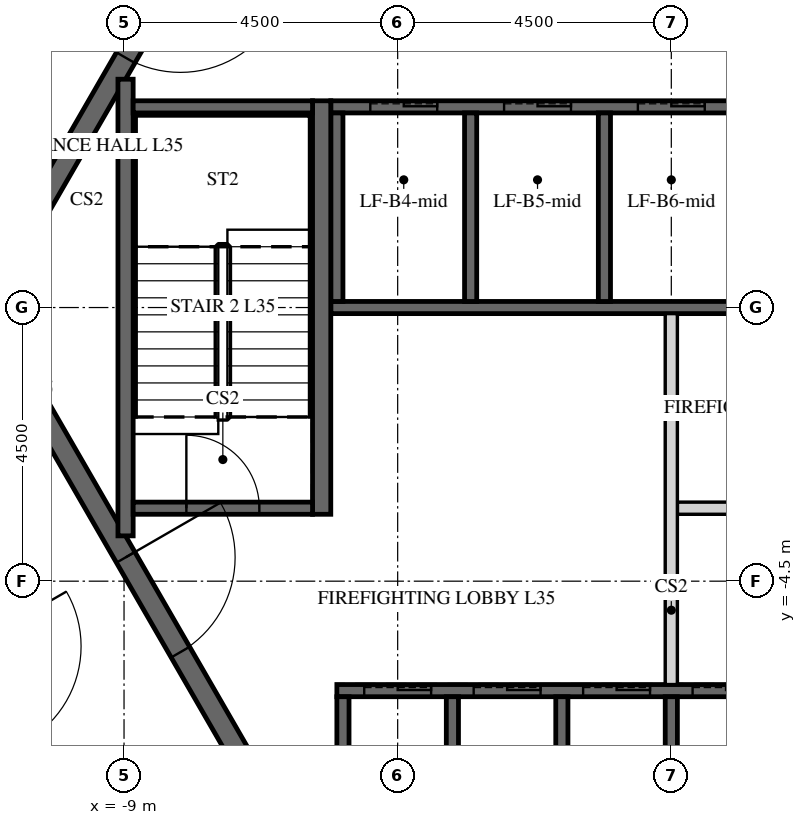
"""IFC4 building model, lengths in metres.
Left out: names, types, materials, properties, quantities, classifications, styles, units other than length and angle.
Written with IfcOpenShell. Run it as: python <this file> out.ifc"""

import sys

from ifc_helpers import new_model, si_unit, direction, frame, frame_2d, origin, place, context, subcontext, project, spatial, polyline, rectangle, outline, extrude, element, fill, save


model = new_model("IFC4")
c1 = context("Model", 3, precision=1e-05, world=origin(), true_north=direction((0.0, 1.0)))
c2 = subcontext(c1, "Body", "Model", "MODEL_VIEW")
j1 = project(units=[si_unit("LENGTHUNIT", "METRE"), si_unit("PLANEANGLEUNIT", "RADIAN")], contexts=[c1])
p1 = place(None, origin())
s1 = spatial("IfcSite", under=j1, at=p1, CompositionType="ELEMENT")
p2 = place(p1, origin())
s2 = spatial("IfcBuilding", under=s1, at=p2, CompositionType="ELEMENT")
p3 = place(p2, frame((0.0, 0.0, 152.7)))
s3 = spatial("IfcBuildingStorey", under=s2, at=p3, CompositionType="ELEMENT", Elevation=152.7)
p4 = place(p3, frame((-7.361, 12.75, 0.0), z_axis=(0.0, 0.0, 1.0), x_axis=(-0.50000571537, -0.866022103989, 0.0)))
e1 = element("IfcWall", 1, at=p4, inside=s3, PredefinedType="SHEAR", context=c2, shape_type="SweptSolid", body=[
    extrude(outline(polyline([(-0.144, -0.25), (14.867, -0.25), (14.578, 0.25), (0.144, 0.25), (-0.144, -0.25)])), origin(), (0.0, 0.0, 1.0), 3.75),
])
p5 = place(p4, frame((6.49, 0.0, 0.0)))
e2 = element("IfcOpeningElement", 2, at=p5, cuts=e1, PredefinedType="OPENING", context=c2, shape_type="SweptSolid", body=[
    extrude(rectangle(XDim=1.8, YDim=2.4, at=frame_2d((0.9, 1.2))), frame((0.0, 0.26, 0.0), z_axis=(0.0, -1.0, 0.0), x_axis=(1.0, 0.0, 0.0)), (0.0, 0.0, 1.0), 0.52),
])
p6 = place(p3, frame((-14.722, 0.0, 0.0), z_axis=(0.0, 0.0, 1.0), x_axis=(0.50000571537, -0.866022103989, 0.0)))
e3 = element("IfcWall", 3, at=p6, inside=s3, PredefinedType="SHEAR", context=c2, shape_type="SweptSolid", body=[
    extrude(outline(polyline([(-0.144, -0.25), (14.867, -0.25), (14.578, 0.25), (0.144, 0.25), (-0.144, -0.25)])), origin(), (0.0, 0.0, 1.0), 3.75),
])
p7 = place(p6, frame((6.432, 0.0, 0.0)))
e4 = element("IfcOpeningElement", 4, at=p7, cuts=e3, PredefinedType="OPENING", context=c2, shape_type="SweptSolid", body=[
    extrude(rectangle(XDim=1.8, YDim=2.4, at=frame_2d((0.9, 1.2))), frame((0.0, 0.26, 0.0), z_axis=(0.0, -1.0, 0.0), x_axis=(1.0, 0.0, 0.0)), (0.0, 0.0, 1.0), 0.52),
])
p8 = place(p3, frame((-5.673, 9.825, 0.0), z_axis=(0.0, 0.0, 1.0), x_axis=(-0.499995046907, -0.866028263435, 0.0)))
e5 = element("IfcWall", 5, at=p8, inside=s3, PredefinedType="SHEAR", context=c2, shape_type="SweptSolid", body=[
    extrude(outline(polyline([(-0.101, -0.175), (11.446, -0.175), (11.244, 0.175), (0.101, 0.175), (-0.101, -0.175)])), origin(), (0.0, 0.0, 1.0), 3.75),
])
p9 = place(p8, frame((4.801, 0.0, 0.0)))
e6 = element("IfcOpeningElement", 6, at=p9, cuts=e5, PredefinedType="OPENING", context=c2, shape_type="SweptSolid", body=[
    extrude(rectangle(XDim=1.8, YDim=2.4, at=frame_2d((0.9, 1.2))), frame((0.0, 0.185, 0.0), z_axis=(0.0, -1.0, 0.0), x_axis=(1.0, 0.0, 0.0)), (0.0, 0.0, 1.0), 0.37),
])
p10 = place(p3, frame((-11.345, 0.0, 0.0), z_axis=(0.0, 0.0, 1.0), x_axis=(0.499995046907, -0.866028263435, 0.0)))
e7 = element("IfcWall", 7, at=p10, inside=s3, PredefinedType="SHEAR", context=c2, shape_type="SweptSolid", body=[
    extrude(outline(polyline([(-0.101, -0.175), (11.446, -0.175), (11.244, 0.175), (0.101, 0.175), (-0.101, -0.175)])), origin(), (0.0, 0.0, 1.0), 3.75),
])
p11 = place(p10, frame((4.744, 0.0, 0.0)))
e8 = element("IfcOpeningElement", 8, at=p11, cuts=e7, PredefinedType="OPENING", context=c2, shape_type="SweptSolid", body=[
    extrude(rectangle(XDim=1.8, YDim=2.4, at=frame_2d((0.9, 1.2))), frame((0.0, 0.185, 0.0), z_axis=(0.0, -1.0, 0.0), x_axis=(1.0, 0.0, 0.0)), (0.0, 0.0, 1.0), 0.37),
])
p12 = place(p3, frame((-5.6, 3.3, -0.5), z_axis=(0.0, 0.0, 1.0), x_axis=(1.0, 0.0, 0.0)))
e9 = element("IfcWall", 9, at=p12, inside=s3, PredefinedType="SHEAR", context=c2, shape_type="SweptSolid", body=[
    extrude(rectangle(XDim=11.2, YDim=0.2, at=frame_2d((5.6, 0.0))), origin(), (0.0, 0.0, 1.0), 4.15),
])
p13 = place(p12, frame((0.65, 0.0, 0.5)))
e10 = element("IfcOpeningElement", 10, at=p13, cuts=e9, PredefinedType="OPENING", context=c2, shape_type="SweptSolid", body=[
    extrude(rectangle(XDim=1.1, YDim=2.1, at=frame_2d((0.55, 1.05))), frame((0.0, 0.11, 0.0), z_axis=(0.0, -1.0, 0.0), x_axis=(1.0, 0.0, 0.0)), (0.0, 0.0, 1.0), 0.22),
])
p14 = place(p12, frame((2.85, 0.0, 0.5)))
e11 = element("IfcOpeningElement", 11, at=p14, cuts=e9, PredefinedType="OPENING", context=c2, shape_type="SweptSolid", body=[
    extrude(rectangle(XDim=1.1, YDim=2.1, at=frame_2d((0.55, 1.05))), frame((0.0, 0.11, 0.0), z_axis=(0.0, -1.0, 0.0), x_axis=(1.0, 0.0, 0.0)), (0.0, 0.0, 1.0), 0.22),
])
p15 = place(p12, frame((5.05, 0.0, 0.5)))
e12 = element("IfcOpeningElement", 12, at=p15, cuts=e9, PredefinedType="OPENING", context=c2, shape_type="SweptSolid", body=[
    extrude(rectangle(XDim=1.1, YDim=2.1, at=frame_2d((0.55, 1.05))), frame((0.0, 0.11, 0.0), z_axis=(0.0, -1.0, 0.0), x_axis=(1.0, 0.0, 0.0)), (0.0, 0.0, 1.0), 0.22),
])
p16 = place(p12, frame((7.25, 0.0, 0.5)))
e13 = element("IfcOpeningElement", 13, at=p16, cuts=e9, PredefinedType="OPENING", context=c2, shape_type="SweptSolid", body=[
    extrude(rectangle(XDim=1.1, YDim=2.1, at=frame_2d((0.55, 1.05))), frame((0.0, 0.11, 0.0), z_axis=(0.0, -1.0, 0.0), x_axis=(1.0, 0.0, 0.0)), (0.0, 0.0, 1.0), 0.22),
])
p17 = place(p12, frame((9.45, 0.0, 0.5)))
e14 = element("IfcOpeningElement", 14, at=p17, cuts=e9, PredefinedType="OPENING", context=c2, shape_type="SweptSolid", body=[
    extrude(rectangle(XDim=1.1, YDim=2.1, at=frame_2d((0.55, 1.05))), frame((0.0, 0.11, 0.0), z_axis=(0.0, -1.0, 0.0), x_axis=(1.0, 0.0, 0.0)), (0.0, 0.0, 1.0), 0.22),
])
p18 = place(p3, frame((-5.6, 0.0, -0.5), z_axis=(0.0, 0.0, 1.0), x_axis=(1.0, 0.0, 0.0)))
e15 = element("IfcWall", 15, at=p18, inside=s3, PredefinedType="SHEAR", context=c2, shape_type="SweptSolid", body=[
    extrude(rectangle(XDim=11.2, YDim=0.2, at=frame_2d((5.6, 0.0))), origin(), (0.0, 0.0, 1.0), 4.15),
])
for number, where, z_axis, x_axis in (
    (16, (-5.5, 0.1, -0.5), (0.0, 0.0, 1.0), (0.0, 1.0, 0.0)),
    (17, (-3.3, 0.1, -0.5), (0.0, 0.0, 1.0), (0.0, 1.0, 0.0)),
    (18, (-1.1, 0.1, -0.5), (0.0, 0.0, 1.0), (0.0, 1.0, 0.0)),
):
    element("IfcWall", number, at=place(p3, frame(where, z_axis=z_axis, x_axis=x_axis)), inside=s3, PredefinedType="SHEAR", context=c2, shape_type="SweptSolid", body=[
        extrude(rectangle(XDim=3.1, YDim=0.2, at=frame_2d((1.55, 0.0))), origin(), (0.0, 0.0, 1.0), 4.15),
    ])
p19 = place(p3, frame((-5.5, -6.3, -0.5), z_axis=(0.0, 0.0, 1.0), x_axis=(1.0, 0.0, 0.0)))
e19 = element("IfcWall", 19, at=p19, inside=s3, PredefinedType="SHEAR", context=c2, shape_type="SweptSolid", body=[
    extrude(rectangle(XDim=9.2, YDim=0.2, at=frame_2d((4.6, 0.0))), origin(), (0.0, 0.0, 1.0), 4.15),
])
p20 = place(p19, frame((0.45, 0.0, 0.5)))
e20 = element("IfcOpeningElement", 20, at=p20, cuts=e19, PredefinedType="OPENING", context=c2, shape_type="SweptSolid", body=[
    extrude(rectangle(XDim=1.1, YDim=2.1, at=frame_2d((0.55, 1.05))), frame((0.0, 0.11, 0.0), z_axis=(0.0, -1.0, 0.0), x_axis=(1.0, 0.0, 0.0)), (0.0, 0.0, 1.0), 0.22),
])
p21 = place(p19, frame((2.25, 0.0, 0.5)))
e21 = element("IfcOpeningElement", 21, at=p21, cuts=e19, PredefinedType="OPENING", context=c2, shape_type="SweptSolid", body=[
    extrude(rectangle(XDim=1.1, YDim=2.1, at=frame_2d((0.55, 1.05))), frame((0.0, 0.11, 0.0), z_axis=(0.0, -1.0, 0.0), x_axis=(1.0, 0.0, 0.0)), (0.0, 0.0, 1.0), 0.22),
])
p22 = place(p19, frame((4.05, 0.0, 0.5)))
e22 = element("IfcOpeningElement", 22, at=p22, cuts=e19, PredefinedType="OPENING", context=c2, shape_type="SweptSolid", body=[
    extrude(rectangle(XDim=1.1, YDim=2.1, at=frame_2d((0.55, 1.05))), frame((0.0, 0.11, 0.0), z_axis=(0.0, -1.0, 0.0), x_axis=(1.0, 0.0, 0.0)), (0.0, 0.0, 1.0), 0.22),
])
p23 = place(p19, frame((5.85, 0.0, 0.5)))
e23 = element("IfcOpeningElement", 23, at=p23, cuts=e19, PredefinedType="OPENING", context=c2, shape_type="SweptSolid", body=[
    extrude(rectangle(XDim=1.1, YDim=2.1, at=frame_2d((0.55, 1.05))), frame((0.0, 0.11, 0.0), z_axis=(0.0, -1.0, 0.0), x_axis=(1.0, 0.0, 0.0)), (0.0, 0.0, 1.0), 0.22),
])
p24 = place(p19, frame((7.65, 0.0, 0.5)))
e24 = element("IfcOpeningElement", 24, at=p24, cuts=e19, PredefinedType="OPENING", context=c2, shape_type="SweptSolid", body=[
    extrude(rectangle(XDim=1.1, YDim=2.1, at=frame_2d((0.55, 1.05))), frame((0.0, 0.11, 0.0), z_axis=(0.0, -1.0, 0.0), x_axis=(1.0, 0.0, 0.0)), (0.0, 0.0, 1.0), 0.22),
])
for number, where, z_axis, x_axis in (
    (25, (-5.4, -9.3, -0.5), (0.0, 0.0, 1.0), (0.0, 1.0, 0.0)),
    (26, (-3.6, -9.3, -0.5), (0.0, 0.0, 1.0), (0.0, 1.0, 0.0)),
    (27, (-1.8, -9.3, -0.5), (0.0, 0.0, 1.0), (0.0, 1.0, 0.0)),
    (28, (0.0, -9.3, -0.5), (0.0, 0.0, 1.0), (0.0, 1.0, 0.0)),
):
    element("IfcWall", number, at=place(p3, frame(where, z_axis=z_axis, x_axis=x_axis)), inside=s3, PredefinedType="SHEAR", context=c2, shape_type="SweptSolid", body=[
        extrude(rectangle(XDim=2.9, YDim=0.2, at=frame_2d((1.45, 0.0))), origin(), (0.0, 0.0, 1.0), 4.15),
    ])
p25 = place(p3, frame((0.1, -3.3, 0.0), z_axis=(0.0, 0.0, 1.0), x_axis=(1.0, 0.0, 0.0)))
e29 = element("IfcWall", 29, at=p25, inside=s3, PredefinedType="PARTITIONING", context=c2, shape_type="SweptSolid", body=[
    extrude(rectangle(XDim=5.5, YDim=0.2, at=frame_2d((2.75, 0.0))), origin(), (0.0, 0.0, 1.0), 3.65),
])
p26 = place(p25, frame((2.3, 0.0, 0.0)))
e30 = element("IfcOpeningElement", 30, at=p26, cuts=e29, PredefinedType="OPENING", context=c2, shape_type="SweptSolid", body=[
    extrude(rectangle(XDim=0.9, YDim=2.1, at=frame_2d((0.45, 1.05))), frame((0.0, 0.11, 0.0), z_axis=(0.0, -1.0, 0.0), x_axis=(1.0, 0.0, 0.0)), (0.0, 0.0, 1.0), 0.22),
])
p27 = place(p3, frame((0.0, -6.2, 0.0), z_axis=(0.0, 0.0, 1.0), x_axis=(0.0, 1.0, 0.0)))
e31 = element("IfcWall", 31, at=p27, inside=s3, PredefinedType="PARTITIONING", context=c2, shape_type="SweptSolid", body=[
    extrude(rectangle(XDim=6.1, YDim=0.2, at=frame_2d((3.05, 0.0))), origin(), (0.0, 0.0, 1.0), 3.65),
])
p28 = place(p3, frame((-5.75, -3.4, -0.5), z_axis=(0.0, 0.0, 1.0), x_axis=(0.0, 1.0, 0.0)))
e32 = element("IfcWall", 32, at=p28, inside=s3, PredefinedType="SHEAR", context=c2, shape_type="SweptSolid", body=[
    extrude(rectangle(XDim=6.8, YDim=0.3, at=frame_2d((3.4, 0.0))), origin(), (0.0, 0.0, 1.0), 4.15),
])
p29 = place(p3, frame((-8.975, -3.755, -0.5), z_axis=(0.0, 0.0, 1.0), x_axis=(0.0, 1.0, 0.0)))
e33 = element("IfcWall", 33, at=p29, inside=s3, PredefinedType="SHEAR", context=c2, shape_type="SweptSolid", body=[
    extrude(rectangle(XDim=7.51, YDim=0.25, at=frame_2d((3.755, 0.0))), origin(), (0.0, 0.0, 1.0), 4.15),
])
p30 = place(p3, frame((-8.85, 3.3, -0.5), z_axis=(0.0, 0.0, 1.0), x_axis=(1.0, 0.0, 0.0)))
e34 = element("IfcWall", 34, at=p30, inside=s3, PredefinedType="SHEAR", context=c2, shape_type="SweptSolid", body=[
    extrude(rectangle(XDim=2.95, YDim=0.2, at=frame_2d((1.475, 0.0))), origin(), (0.0, 0.0, 1.0), 4.15),
])
p31 = place(p3, frame((-8.85, -3.3, -0.5), z_axis=(0.0, 0.0, 1.0), x_axis=(1.0, 0.0, 0.0)))
e35 = element("IfcWall", 35, at=p31, inside=s3, PredefinedType="SHEAR", context=c2, shape_type="SweptSolid", body=[
    extrude(rectangle(XDim=2.95, YDim=0.2, at=frame_2d((1.475, 0.0))), origin(), (0.0, 0.0, 1.0), 4.15),
])
p32 = place(p31, frame((0.875, 0.0, 0.5)))
e36 = element("IfcOpeningElement", 36, at=p32, cuts=e35, PredefinedType="OPENING", context=c2, shape_type="SweptSolid", body=[
    extrude(rectangle(XDim=1.2, YDim=2.4, at=frame_2d((0.6, 1.2))), frame((0.0, 0.11, 0.0), z_axis=(0.0, -1.0, 0.0), x_axis=(1.0, 0.0, 0.0)), (0.0, 0.0, 1.0), 0.22),
])
p33 = place(p3, frame((-8.588, 14.725, 0.0), z_axis=(0.0, 0.0, 1.0), x_axis=(-0.499996322767, -0.866027526826, 0.0)))
e37 = element("IfcWall", 37, at=p33, inside=s3, PredefinedType="PARTITIONING", context=c2, shape_type="SweptSolid", body=[
    extrude(rectangle(XDim=14.636, YDim=0.15, at=frame_2d((7.318, 0.0))), origin(), (0.0, 0.0, 1.0), 2.823),
])
p34 = place(p33, frame((0.936, 0.0, 0.0)))
e38 = element("IfcOpeningElement", 38, at=p34, cuts=e37, PredefinedType="OPENING", context=c2, shape_type="SweptSolid", body=[
    extrude(rectangle(XDim=1.0, YDim=2.1, at=frame_2d((0.5, 1.05))), frame((0.0, 0.085, 0.0), z_axis=(0.0, -1.0, 0.0), x_axis=(1.0, 0.0, 0.0)), (0.0, 0.0, 1.0), 0.17),
])
p35 = place(p33, frame((9.495, 0.0, 0.0)))
e39 = element("IfcOpeningElement", 39, at=p35, cuts=e37, PredefinedType="OPENING", context=c2, shape_type="SweptSolid", body=[
    extrude(rectangle(XDim=1.0, YDim=2.1, at=frame_2d((0.5, 1.05))), frame((0.0, 0.085, 0.0), z_axis=(0.0, -1.0, 0.0), x_axis=(1.0, 0.0, 0.0)), (0.0, 0.0, 1.0), 0.17),
])
p36 = place(p3, frame((-15.863, -2.125, 0.0), z_axis=(0.0, 0.0, 1.0), x_axis=(0.500008833422, -0.866020303746, 0.0)))
e40 = element("IfcWall", 40, at=p36, inside=s3, PredefinedType="PARTITIONING", context=c2, shape_type="SweptSolid", body=[
    extrude(rectangle(XDim=14.636, YDim=0.15, at=frame_2d((7.318, 0.0))), origin(), (0.0, 0.0, 1.0), 2.823),
])
p37 = place(p36, frame((0.961, 0.0, 0.0)))
e41 = element("IfcOpeningElement", 41, at=p37, cuts=e40, PredefinedType="OPENING", context=c2, shape_type="SweptSolid", body=[
    extrude(rectangle(XDim=1.0, YDim=2.1, at=frame_2d((0.5, 1.05))), frame((0.0, 0.085, 0.0), z_axis=(0.0, -1.0, 0.0), x_axis=(1.0, 0.0, 0.0)), (0.0, 0.0, 1.0), 0.17),
])
p38 = place(p36, frame((7.309, 0.0, 0.0)))
e42 = element("IfcOpeningElement", 42, at=p38, cuts=e40, PredefinedType="OPENING", context=c2, shape_type="SweptSolid", body=[
    extrude(rectangle(XDim=1.0, YDim=2.1, at=frame_2d((0.5, 1.05))), frame((0.0, 0.085, 0.0), z_axis=(0.0, -1.0, 0.0), x_axis=(1.0, 0.0, 0.0)), (0.0, 0.0, 1.0), 0.17),
])
p39 = place(p36, frame((13.486, 0.0, 0.0)))
e43 = element("IfcOpeningElement", 43, at=p39, cuts=e40, PredefinedType="OPENING", context=c2, shape_type="SweptSolid", body=[
    extrude(rectangle(XDim=1.0, YDim=2.1, at=frame_2d((0.5, 1.05))), frame((0.0, 0.085, 0.0), z_axis=(0.0, -1.0, 0.0), x_axis=(1.0, 0.0, 0.0)), (0.0, 0.0, 1.0), 0.17),
])
p40 = place(p9, origin())
e44 = element("IfcDoor", 44, at=p40, inside=s3, OperationType="DOUBLE_DOOR_SINGLE_SWING", PredefinedType="DOOR", context=c2, shape_type="SweptSolid", body=[
    extrude(rectangle(XDim=1.8, YDim=2.4, at=frame_2d((0.9, 1.2))), frame((0.0, 0.025, 0.0), z_axis=(0.0, -1.0, 0.0), x_axis=(1.0, 0.0, 0.0)), (0.0, 0.0, 1.0), 0.05),
])
fill(e6, e44)
p41 = place(p11, origin())
e45 = element("IfcDoor", 45, at=p41, inside=s3, OperationType="DOUBLE_DOOR_SINGLE_SWING", PredefinedType="DOOR", context=c2, shape_type="SweptSolid", body=[
    extrude(rectangle(XDim=1.8, YDim=2.4, at=frame_2d((0.9, 1.2))), frame((0.0, 0.025, 0.0), z_axis=(0.0, -1.0, 0.0), x_axis=(1.0, 0.0, 0.0)), (0.0, 0.0, 1.0), 0.05),
])
fill(e8, e45)
p42 = place(p32, origin())
e46 = element("IfcDoor", 46, at=p42, inside=s3, OperationType="SINGLE_SWING_LEFT", PredefinedType="DOOR", context=c2, shape_type="SweptSolid", body=[
    extrude(rectangle(XDim=1.2, YDim=2.4, at=frame_2d((0.6, 1.2))), frame((0.0, 0.025, 0.0), z_axis=(0.0, -1.0, 0.0), x_axis=(1.0, 0.0, 0.0)), (0.0, 0.0, 1.0), 0.05),
])
fill(e36, e46)
p43 = place(p13, origin())
e47 = element("IfcDoor", 47, at=p43, inside=s3, OperationType="SLIDING_TO_LEFT", PredefinedType="DOOR", context=c2, shape_type="SweptSolid", body=[
    extrude(rectangle(XDim=1.1, YDim=2.1, at=frame_2d((0.55, 1.05))), frame((0.0, 0.025, 0.0), z_axis=(0.0, -1.0, 0.0), x_axis=(1.0, 0.0, 0.0)), (0.0, 0.0, 1.0), 0.05),
])
fill(e10, e47)
p44 = place(p14, origin())
e48 = element("IfcDoor", 48, at=p44, inside=s3, OperationType="SLIDING_TO_LEFT", PredefinedType="DOOR", context=c2, shape_type="SweptSolid", body=[
    extrude(rectangle(XDim=1.1, YDim=2.1, at=frame_2d((0.55, 1.05))), frame((0.0, 0.025, 0.0), z_axis=(0.0, -1.0, 0.0), x_axis=(1.0, 0.0, 0.0)), (0.0, 0.0, 1.0), 0.05),
])
fill(e11, e48)
p45 = place(p15, origin())
e49 = element("IfcDoor", 49, at=p45, inside=s3, OperationType="SLIDING_TO_LEFT", PredefinedType="DOOR", context=c2, shape_type="SweptSolid", body=[
    extrude(rectangle(XDim=1.1, YDim=2.1, at=frame_2d((0.55, 1.05))), frame((0.0, 0.025, 0.0), z_axis=(0.0, -1.0, 0.0), x_axis=(1.0, 0.0, 0.0)), (0.0, 0.0, 1.0), 0.05),
])
fill(e12, e49)
p46 = place(p20, origin())
e50 = element("IfcDoor", 50, at=p46, inside=s3, OperationType="SLIDING_TO_LEFT", PredefinedType="DOOR", context=c2, shape_type="SweptSolid", body=[
    extrude(rectangle(XDim=1.1, YDim=2.1, at=frame_2d((0.55, 1.05))), frame((0.0, 0.025, 0.0), z_axis=(0.0, -1.0, 0.0), x_axis=(1.0, 0.0, 0.0)), (0.0, 0.0, 1.0), 0.05),
])
fill(e20, e50)
p47 = place(p21, origin())
e51 = element("IfcDoor", 51, at=p47, inside=s3, OperationType="SLIDING_TO_LEFT", PredefinedType="DOOR", context=c2, shape_type="SweptSolid", body=[
    extrude(rectangle(XDim=1.1, YDim=2.1, at=frame_2d((0.55, 1.05))), frame((0.0, 0.025, 0.0), z_axis=(0.0, -1.0, 0.0), x_axis=(1.0, 0.0, 0.0)), (0.0, 0.0, 1.0), 0.05),
])
fill(e21, e51)
p48 = place(p22, origin())
e52 = element("IfcDoor", 52, at=p48, inside=s3, OperationType="SLIDING_TO_LEFT", PredefinedType="DOOR", context=c2, shape_type="SweptSolid", body=[
    extrude(rectangle(XDim=1.1, YDim=2.1, at=frame_2d((0.55, 1.05))), frame((0.0, 0.025, 0.0), z_axis=(0.0, -1.0, 0.0), x_axis=(1.0, 0.0, 0.0)), (0.0, 0.0, 1.0), 0.05),
])
fill(e22, e52)
p49 = place(p23, origin())
e53 = element("IfcDoor", 53, at=p49, inside=s3, OperationType="SLIDING_TO_LEFT", PredefinedType="DOOR", context=c2, shape_type="SweptSolid", body=[
    extrude(rectangle(XDim=1.1, YDim=2.1, at=frame_2d((0.55, 1.05))), frame((0.0, 0.025, 0.0), z_axis=(0.0, -1.0, 0.0), x_axis=(1.0, 0.0, 0.0)), (0.0, 0.0, 1.0), 0.05),
])
fill(e23, e53)
save(model, sys.argv[1])
